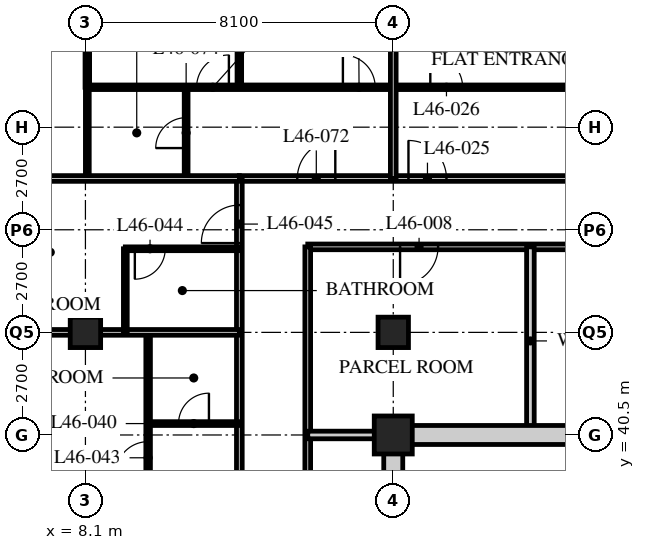
"""IFC4 building model, lengths in metres.
Left out: names, types, materials, properties, quantities, classifications, styles, units other than length and angle.
Written with IfcOpenShell. Run it as: python <this file> out.ifc"""

import sys

from ifc_helpers import new_model, si_unit, direction, frame, frame_2d, origin, origin_2d, place, context, subcontext, project, spatial, rectangle, hollow_rectangle, extrude, element, fill, save


model = new_model("IFC4")
c1 = context("Model", 3, precision=1e-05, world=origin(), true_north=direction((0.0, 1.0)))
c2 = subcontext(c1, "Body", "Model", "MODEL_VIEW")
j1 = project(units=[si_unit("LENGTHUNIT", "METRE"), si_unit("PLANEANGLEUNIT", "RADIAN")], contexts=[c1])
p1 = place(None, origin())
s1 = spatial("IfcSite", under=j1, at=p1, CompositionType="ELEMENT")
p2 = place(p1, origin())
s2 = spatial("IfcBuilding", under=s1, at=p2, CompositionType="ELEMENT")
p3 = place(p2, frame((0.0, 0.0, 181.2)))
s3 = spatial("IfcBuildingStorey", under=s2, at=p3, CompositionType="ELEMENT", Elevation=181.2)
p4 = place(p3, frame((8.1, 43.2, 0.0), z_axis=(0.0, 0.0, 1.0), x_axis=(1.0, 0.0, 0.0)))
e1 = element("IfcColumn", 1, at=p4, inside=s3, PredefinedType="COLUMN", context=c2, shape_type="SweptSolid", body=[
    extrude(hollow_rectangle(XDim=0.8, YDim=0.8, WallThickness=0.08, at=origin_2d()), origin(), (0.0, 0.0, 1.0), 3.6),
])
p5 = place(p3, frame((16.2, 40.5, 0.0), z_axis=(0.0, 0.0, 1.0), x_axis=(1.0, 0.0, 0.0)))
e2 = element("IfcColumn", 2, at=p5, inside=s3, PredefinedType="COLUMN", context=c2, shape_type="SweptSolid", body=[
    extrude(hollow_rectangle(XDim=1.0, YDim=1.0, WallThickness=0.1, at=origin_2d()), origin(), (0.0, 0.0, 1.0), 3.6),
])
p6 = place(p3, frame((16.2, 43.2, 0.0), z_axis=(0.0, 0.0, 1.0), x_axis=(1.0, 0.0, 0.0)))
e3 = element("IfcColumn", 3, at=p6, inside=s3, PredefinedType="COLUMN", context=c2, shape_type="SweptSolid", body=[
    extrude(hollow_rectangle(XDim=0.8, YDim=0.8, WallThickness=0.08, at=origin_2d()), origin(), (0.0, 0.0, 1.0), 3.6),
])
p7 = place(p3, frame((12.15, 47.25, 0.0), z_axis=(0.0, 0.0, 1.0), x_axis=(1.0, 0.0, 0.0)))
e4 = element("IfcWall", 4, at=p7, inside=s3, PredefinedType="PARTITIONING", context=c2, shape_type="SweptSolid", body=[
    extrude(rectangle(XDim=32.4, YDim=0.15, at=frame_2d((16.2, 0.0))), origin(), (0.0, 0.0, 1.0), 3.39),
])
p8 = place(p7, frame((4.45, 0.0, 0.0)))
e5 = element("IfcOpeningElement", 5, at=p8, cuts=e4, PredefinedType="OPENING", context=c2, shape_type="SweptSolid", body=[
    extrude(rectangle(XDim=1.0, YDim=2.1, at=frame_2d((0.5, 1.05))), frame((0.0, 0.085, 0.0), z_axis=(0.0, -1.0, 0.0), x_axis=(1.0, 0.0, 0.0)), (0.0, 0.0, 1.0), 0.17),
])
p9 = place(p7, frame((16.6, 0.0, 0.0)))
e6 = element("IfcOpeningElement", 6, at=p9, cuts=e4, PredefinedType="OPENING", context=c2, shape_type="SweptSolid", body=[
    extrude(rectangle(XDim=1.0, YDim=2.1, at=frame_2d((0.5, 1.05))), frame((0.0, 0.085, 0.0), z_axis=(0.0, -1.0, 0.0), x_axis=(1.0, 0.0, 0.0)), (0.0, 0.0, 1.0), 0.17),
])
p10 = place(p7, frame((29.875, 0.0, 0.0)))
e7 = element("IfcOpeningElement", 7, at=p10, cuts=e4, PredefinedType="OPENING", context=c2, shape_type="SweptSolid", body=[
    extrude(rectangle(XDim=1.0, YDim=2.1, at=frame_2d((0.5, 1.05))), frame((0.0, 0.085, 0.0), z_axis=(0.0, -1.0, 0.0), x_axis=(1.0, 0.0, 0.0)), (0.0, 0.0, 1.0), 0.17),
])
p11 = place(p7, frame((1.525, 0.0, 0.0)))
e8 = element("IfcOpeningElement", 8, at=p11, cuts=e4, PredefinedType="OPENING", context=c2, shape_type="SweptSolid", body=[
    extrude(rectangle(XDim=1.0, YDim=2.1, at=frame_2d((0.5, 1.05))), frame((0.0, 0.085, 0.0), z_axis=(0.0, -1.0, 0.0), x_axis=(1.0, 0.0, 0.0)), (0.0, 0.0, 1.0), 0.17),
])
p12 = place(p3, frame((12.15, 18.9, 0.0), z_axis=(0.0, 0.0, 1.0), x_axis=(0.0, 1.0, 0.0)))
e9 = element("IfcWall", 9, at=p12, inside=s3, PredefinedType="PARTITIONING", context=c2, shape_type="SweptSolid", body=[
    extrude(rectangle(XDim=28.35, YDim=0.15, at=frame_2d((14.175, 0.0))), origin(), (0.0, 0.0, 1.0), 3.39),
])
p13 = place(p12, frame((2.35, 0.0, 0.0)))
e10 = element("IfcOpeningElement", 10, at=p13, cuts=e9, PredefinedType="OPENING", context=c2, shape_type="SweptSolid", body=[
    extrude(rectangle(XDim=1.0, YDim=2.1, at=frame_2d((0.5, 1.05))), frame((0.0, 0.085, 0.0), z_axis=(0.0, -1.0, 0.0), x_axis=(1.0, 0.0, 0.0)), (0.0, 0.0, 1.0), 0.17),
])
p14 = place(p12, frame((6.4, 0.0, 0.0)))
e11 = element("IfcOpeningElement", 11, at=p14, cuts=e9, PredefinedType="OPENING", context=c2, shape_type="SweptSolid", body=[
    extrude(rectangle(XDim=1.0, YDim=2.1, at=frame_2d((0.5, 1.05))), frame((0.0, 0.085, 0.0), z_axis=(0.0, -1.0, 0.0), x_axis=(1.0, 0.0, 0.0)), (0.0, 0.0, 1.0), 0.17),
])
p15 = place(p12, frame((8.5, 0.0, 0.0)))
e12 = element("IfcOpeningElement", 12, at=p15, cuts=e9, PredefinedType="OPENING", context=c2, shape_type="SweptSolid", body=[
    extrude(rectangle(XDim=1.0, YDim=2.1, at=frame_2d((0.5, 1.05))), frame((0.0, 0.085, 0.0), z_axis=(0.0, -1.0, 0.0), x_axis=(1.0, 0.0, 0.0)), (0.0, 0.0, 1.0), 0.17),
])
p16 = place(p12, frame((16.6, 0.0, 0.0)))
e13 = element("IfcOpeningElement", 13, at=p16, cuts=e9, PredefinedType="OPENING", context=c2, shape_type="SweptSolid", body=[
    extrude(rectangle(XDim=1.0, YDim=2.1, at=frame_2d((0.5, 1.05))), frame((0.0, 0.085, 0.0), z_axis=(0.0, -1.0, 0.0), x_axis=(1.0, 0.0, 0.0)), (0.0, 0.0, 1.0), 0.17),
])
p17 = place(p12, frame((26.65, 0.0, 0.0)))
e14 = element("IfcOpeningElement", 14, at=p17, cuts=e9, PredefinedType="OPENING", context=c2, shape_type="SweptSolid", body=[
    extrude(rectangle(XDim=1.0, YDim=2.1, at=frame_2d((0.5, 1.05))), frame((0.0, 0.085, 0.0), z_axis=(0.0, -1.0, 0.0), x_axis=(1.0, 0.0, 0.0)), (0.0, 0.0, 1.0), 0.17),
])
p18 = place(p3, frame((27.14, 45.45, 0.0), z_axis=(0.0, 0.0, 1.0), x_axis=(-1.0, 0.0, 0.0)))
e15 = element("IfcWall", 15, at=p18, inside=s3, PredefinedType="PARTITIONING", context=c2, shape_type="SweptSolid", body=[
    extrude(rectangle(XDim=13.19, YDim=0.15, at=frame_2d((6.595, 0.0))), origin(), (0.0, 0.0, 1.0), 3.39),
])
p19 = place(p18, frame((9.761, 0.0, 0.0)))
e16 = element("IfcOpeningElement", 16, at=p19, cuts=e15, PredefinedType="OPENING", context=c2, shape_type="SweptSolid", body=[
    extrude(rectangle(XDim=1.0, YDim=2.1, at=frame_2d((0.5, 1.05))), frame((0.0, 0.085, 0.0), z_axis=(0.0, -1.0, 0.0), x_axis=(1.0, 0.0, 0.0)), (0.0, 0.0, 1.0), 0.17),
])
p20 = place(p18, frame((3.161, 0.0, 0.0)))
e17 = element("IfcOpeningElement", 17, at=p20, cuts=e15, PredefinedType="OPENING", context=c2, shape_type="SweptSolid", body=[
    extrude(rectangle(XDim=1.0, YDim=2.1, at=frame_2d((0.5, 1.05))), frame((0.0, 0.085, 0.0), z_axis=(0.0, -1.0, 0.0), x_axis=(1.0, 0.0, 0.0)), (0.0, 0.0, 1.0), 0.17),
])
p21 = place(p3, frame((13.95, 45.45, 0.0), z_axis=(0.0, 0.0, 1.0), x_axis=(0.0, -1.0, 0.0)))
e18 = element("IfcWall", 18, at=p21, inside=s3, PredefinedType="PARTITIONING", context=c2, shape_type="SweptSolid", body=[
    extrude(rectangle(XDim=24.75, YDim=0.15, at=frame_2d((12.375, 0.0))), origin(), (0.0, 0.0, 1.0), 3.39),
])
p22 = place(p21, frame((16.6, 0.0, 0.0)))
e19 = element("IfcOpeningElement", 19, at=p22, cuts=e18, PredefinedType="OPENING", context=c2, shape_type="SweptSolid", body=[
    extrude(rectangle(XDim=1.0, YDim=2.1, at=frame_2d((0.5, 1.05))), frame((0.0, 0.085, 0.0), z_axis=(0.0, -1.0, 0.0), x_axis=(1.0, 0.0, 0.0)), (0.0, 0.0, 1.0), 0.17),
])
p23 = place(p21, frame((8.5, 0.0, 0.0)))
e20 = element("IfcOpeningElement", 20, at=p23, cuts=e18, PredefinedType="OPENING", context=c2, shape_type="SweptSolid", body=[
    extrude(rectangle(XDim=1.0, YDim=2.1, at=frame_2d((0.5, 1.05))), frame((0.0, 0.085, 0.0), z_axis=(0.0, -1.0, 0.0), x_axis=(1.0, 0.0, 0.0)), (0.0, 0.0, 1.0), 0.17),
])
p24 = place(p3, frame((19.809, 45.45, 0.0), z_axis=(0.0, 0.0, 1.0), x_axis=(0.0, -1.0, 0.0)))
e21 = element("IfcWall", 21, at=p24, inside=s3, PredefinedType="SOLIDWALL", context=c2, shape_type="SweptSolid", body=[
    extrude(rectangle(XDim=4.95, YDim=0.2, at=frame_2d((2.475, 0.0))), origin(), (0.0, 0.0, 1.0), 3.39),
])
p25 = place(p3, frame((13.95, 40.5, 0.0), z_axis=(0.0, 0.0, 1.0), x_axis=(1.0, 0.0, 0.0)))
e22 = element("IfcWall", 22, at=p25, inside=s3, PredefinedType="SOLIDWALL", context=c2, shape_type="SweptSolid", body=[
    extrude(rectangle(XDim=2.25, YDim=0.2, at=frame_2d((1.125, 0.0))), origin(), (0.0, 0.0, 1.0), 3.39),
])
p26 = place(p3, frame((9.75, 27.0, 0.0), z_axis=(0.0, 0.0, 1.0), x_axis=(0.0, 1.0, 0.0)))
e23 = element("IfcWall", 23, at=p26, inside=s3, PredefinedType="PARTITIONING", context=c2, shape_type="SweptSolid", body=[
    extrude(rectangle(XDim=16.2, YDim=0.12, at=frame_2d((8.1, 0.0))), origin(), (0.0, 0.0, 1.0), 3.39),
])
p27 = place(p26, frame((0.975, 0.0, 0.0)))
e24 = element("IfcOpeningElement", 24, at=p27, cuts=e23, PredefinedType="OPENING", context=c2, shape_type="SweptSolid", body=[
    extrude(rectangle(XDim=0.85, YDim=2.1, at=frame_2d((0.425, 1.05))), frame((0.0, 0.07, 0.0), z_axis=(0.0, -1.0, 0.0), x_axis=(1.0, 0.0, 0.0)), (0.0, 0.0, 1.0), 0.14),
])
p28 = place(p26, frame((4.375, 0.0, 0.0)))
e25 = element("IfcOpeningElement", 25, at=p28, cuts=e23, PredefinedType="OPENING", context=c2, shape_type="SweptSolid", body=[
    extrude(rectangle(XDim=0.85, YDim=2.1, at=frame_2d((0.425, 1.05))), frame((0.0, 0.07, 0.0), z_axis=(0.0, -1.0, 0.0), x_axis=(1.0, 0.0, 0.0)), (0.0, 0.0, 1.0), 0.14),
])
p29 = place(p26, frame((9.075, 0.0, 0.0)))
e26 = element("IfcOpeningElement", 26, at=p29, cuts=e23, PredefinedType="OPENING", context=c2, shape_type="SweptSolid", body=[
    extrude(rectangle(XDim=0.85, YDim=2.1, at=frame_2d((0.425, 1.05))), frame((0.0, 0.07, 0.0), z_axis=(0.0, -1.0, 0.0), x_axis=(1.0, 0.0, 0.0)), (0.0, 0.0, 1.0), 0.14),
])
p30 = place(p26, frame((12.475, 0.0, 0.0)))
e27 = element("IfcOpeningElement", 27, at=p30, cuts=e23, PredefinedType="OPENING", context=c2, shape_type="SweptSolid", body=[
    extrude(rectangle(XDim=0.85, YDim=2.1, at=frame_2d((0.425, 1.05))), frame((0.0, 0.07, 0.0), z_axis=(0.0, -1.0, 0.0), x_axis=(1.0, 0.0, 0.0)), (0.0, 0.0, 1.0), 0.14),
])
p31 = place(p3, frame((12.15, 40.8, 0.0), z_axis=(0.0, 0.0, 1.0), x_axis=(-1.0, 0.0, 0.0)))
e28 = element("IfcWall", 28, at=p31, inside=s3, PredefinedType="PARTITIONING", context=c2, shape_type="SweptSolid", body=[
    extrude(rectangle(XDim=2.4, YDim=0.1, at=frame_2d((1.2, 0.0))), origin(), (0.0, 0.0, 1.0), 3.39),
])
p32 = place(p31, frame((0.8, 0.0, 0.0)))
e29 = element("IfcOpeningElement", 29, at=p32, cuts=e28, PredefinedType="OPENING", context=c2, shape_type="SweptSolid", body=[
    extrude(rectangle(XDim=0.8, YDim=2.1, at=frame_2d((0.4, 1.05))), frame((0.0, 0.06, 0.0), z_axis=(0.0, -1.0, 0.0), x_axis=(1.0, 0.0, 0.0)), (0.0, 0.0, 1.0), 0.12),
])
p33 = place(p3, frame((12.15, 43.2, 0.0), z_axis=(0.0, 0.0, 1.0), x_axis=(-1.0, 0.0, 0.0)))
e30 = element("IfcWall", 30, at=p33, inside=s3, PredefinedType="PARTITIONING", context=c2, shape_type="SweptSolid", body=[
    extrude(rectangle(XDim=11.85, YDim=0.15, at=frame_2d((5.925, 0.0))), origin(), (0.0, 0.0, 1.0), 2.778),
])
p34 = place(p3, frame((9.15, 43.2, 0.0), z_axis=(0.0, 0.0, 1.0), x_axis=(0.0, 1.0, 0.0)))
e31 = element("IfcWall", 31, at=p34, inside=s3, PredefinedType="PARTITIONING", context=c2, shape_type="SweptSolid", body=[
    extrude(rectangle(XDim=2.2, YDim=0.1, at=frame_2d((1.1, 0.0))), origin(), (0.0, 0.0, 1.0), 3.39),
])
p35 = place(p3, frame((12.15, 45.4, 0.0), z_axis=(0.0, 0.0, 1.0), x_axis=(-1.0, 0.0, 0.0)))
e32 = element("IfcWall", 32, at=p35, inside=s3, PredefinedType="PARTITIONING", context=c2, shape_type="SweptSolid", body=[
    extrude(rectangle(XDim=3.0, YDim=0.1, at=frame_2d((1.5, 0.0))), origin(), (0.0, 0.0, 1.0), 3.39),
])
p36 = place(p35, frame((1.95, 0.0, 0.0)))
e33 = element("IfcOpeningElement", 33, at=p36, cuts=e32, PredefinedType="OPENING", context=c2, shape_type="SweptSolid", body=[
    extrude(rectangle(XDim=0.8, YDim=2.1, at=frame_2d((0.4, 1.05))), frame((0.0, 0.06, 0.0), z_axis=(0.0, -1.0, 0.0), x_axis=(1.0, 0.0, 0.0)), (0.0, 0.0, 1.0), 0.12),
])
p37 = place(p3, frame((10.75, 47.25, 0.0), z_axis=(0.0, 0.0, 1.0), x_axis=(0.0, 1.0, 0.0)))
e34 = element("IfcWall", 34, at=p37, inside=s3, PredefinedType="PARTITIONING", context=c2, shape_type="SweptSolid", body=[
    extrude(rectangle(XDim=2.4, YDim=0.1, at=frame_2d((1.2, 0.0))), origin(), (0.0, 0.0, 1.0), 3.39),
])
p38 = place(p37, frame((0.8, 0.0, 0.0)))
e35 = element("IfcOpeningElement", 35, at=p38, cuts=e34, PredefinedType="OPENING", context=c2, shape_type="SweptSolid", body=[
    extrude(rectangle(XDim=0.8, YDim=2.1, at=frame_2d((0.4, 1.05))), frame((0.0, 0.06, 0.0), z_axis=(0.0, -1.0, 0.0), x_axis=(1.0, 0.0, 0.0)), (0.0, 0.0, 1.0), 0.12),
])
p39 = place(p3, frame((8.15, 47.25, 0.0), z_axis=(0.0, 0.0, 1.0), x_axis=(0.0, 1.0, 0.0)))
e36 = element("IfcWall", 36, at=p39, inside=s3, PredefinedType="PARTITIONING", context=c2, shape_type="SweptSolid", body=[
    extrude(rectangle(XDim=2.4, YDim=0.1, at=frame_2d((1.2, 0.0))), origin(), (0.0, 0.0, 1.0), 2.778),
])
p40 = place(p3, frame((8.15, 49.65, 0.0), z_axis=(0.0, 0.0, 1.0), x_axis=(1.0, 0.0, 0.0)))
e37 = element("IfcWall", 37, at=p40, inside=s3, PredefinedType="PARTITIONING", context=c2, shape_type="SweptSolid", body=[
    extrude(rectangle(XDim=40.4, YDim=0.12, at=frame_2d((20.2, 0.0))), origin(), (0.0, 0.0, 1.0), 3.39),
])
p41 = place(p40, frame((9.025, 0.0, 0.0)))
e38 = element("IfcOpeningElement", 38, at=p41, cuts=e37, PredefinedType="OPENING", context=c2, shape_type="SweptSolid", body=[
    extrude(rectangle(XDim=0.85, YDim=2.1, at=frame_2d((0.425, 1.05))), frame((0.0, 0.07, 0.0), z_axis=(0.0, -1.0, 0.0), x_axis=(1.0, 0.0, 0.0)), (0.0, 0.0, 1.0), 0.14),
])
p42 = place(p40, frame((16.475, 0.0, 0.0)))
e39 = element("IfcOpeningElement", 39, at=p42, cuts=e37, PredefinedType="OPENING", context=c2, shape_type="SweptSolid", body=[
    extrude(rectangle(XDim=0.85, YDim=2.1, at=frame_2d((0.425, 1.05))), frame((0.0, 0.07, 0.0), z_axis=(0.0, -1.0, 0.0), x_axis=(1.0, 0.0, 0.0)), (0.0, 0.0, 1.0), 0.14),
])
p43 = place(p40, frame((21.175, 0.0, 0.0)))
e40 = element("IfcOpeningElement", 40, at=p43, cuts=e37, PredefinedType="OPENING", context=c2, shape_type="SweptSolid", body=[
    extrude(rectangle(XDim=0.85, YDim=2.1, at=frame_2d((0.425, 1.05))), frame((0.0, 0.07, 0.0), z_axis=(0.0, -1.0, 0.0), x_axis=(1.0, 0.0, 0.0)), (0.0, 0.0, 1.0), 0.14),
])
p44 = place(p40, frame((28.625, 0.0, 0.0)))
e41 = element("IfcOpeningElement", 41, at=p44, cuts=e37, PredefinedType="OPENING", context=c2, shape_type="SweptSolid", body=[
    extrude(rectangle(XDim=0.85, YDim=2.1, at=frame_2d((0.425, 1.05))), frame((0.0, 0.07, 0.0), z_axis=(0.0, -1.0, 0.0), x_axis=(1.0, 0.0, 0.0)), (0.0, 0.0, 1.0), 0.14),
])
p45 = place(p40, frame((32.825, 0.0, 0.0)))
e42 = element("IfcOpeningElement", 42, at=p45, cuts=e37, PredefinedType="OPENING", context=c2, shape_type="SweptSolid", body=[
    extrude(rectangle(XDim=0.85, YDim=2.1, at=frame_2d((0.425, 1.05))), frame((0.0, 0.07, 0.0), z_axis=(0.0, -1.0, 0.0), x_axis=(1.0, 0.0, 0.0)), (0.0, 0.0, 1.0), 0.14),
])
p46 = place(p40, frame((36.675, 0.0, 0.0)))
e43 = element("IfcOpeningElement", 43, at=p46, cuts=e37, PredefinedType="OPENING", context=c2, shape_type="SweptSolid", body=[
    extrude(rectangle(XDim=0.85, YDim=2.1, at=frame_2d((0.425, 1.05))), frame((0.0, 0.07, 0.0), z_axis=(0.0, -1.0, 0.0), x_axis=(1.0, 0.0, 0.0)), (0.0, 0.0, 1.0), 0.14),
])
p47 = place(p40, frame((6.725, 0.0, 0.0)))
e44 = element("IfcOpeningElement", 44, at=p47, cuts=e37, PredefinedType="OPENING", context=c2, shape_type="SweptSolid", body=[
    extrude(rectangle(XDim=0.85, YDim=2.1, at=frame_2d((0.425, 1.05))), frame((0.0, 0.07, 0.0), z_axis=(0.0, -1.0, 0.0), x_axis=(1.0, 0.0, 0.0)), (0.0, 0.0, 1.0), 0.14),
])
p48 = place(p40, frame((2.875, 0.0, 0.0)))
e45 = element("IfcOpeningElement", 45, at=p48, cuts=e37, PredefinedType="OPENING", context=c2, shape_type="SweptSolid", body=[
    extrude(rectangle(XDim=0.85, YDim=2.1, at=frame_2d((0.425, 1.05))), frame((0.0, 0.07, 0.0), z_axis=(0.0, -1.0, 0.0), x_axis=(1.0, 0.0, 0.0)), (0.0, 0.0, 1.0), 0.14),
])
p49 = place(p3, frame((12.15, 49.65, 0.0), z_axis=(0.0, 0.0, 1.0), x_axis=(0.0, 1.0, 0.0)))
e46 = element("IfcWall", 46, at=p49, inside=s3, PredefinedType="PARTITIONING", context=c2, shape_type="SweptSolid", body=[
    extrude(rectangle(XDim=9.45, YDim=0.12, at=frame_2d((4.725, 0.0))), origin(), (0.0, 0.0, 1.0), 3.39),
])
p50 = place(p3, frame((0.3, 47.25, 0.0), z_axis=(0.0, 0.0, 1.0), x_axis=(1.0, 0.0, 0.0)))
e47 = element("IfcWall", 47, at=p50, inside=s3, PredefinedType="PARTITIONING", context=c2, shape_type="SweptSolid", body=[
    extrude(rectangle(XDim=11.85, YDim=0.15, at=frame_2d((5.925, 0.0))), origin(), (0.0, 0.0, 1.0), 3.39),
])
p51 = place(p3, frame((16.2, 47.25, 0.0), z_axis=(0.0, 0.0, 1.0), x_axis=(0.0, 1.0, 0.0)))
e48 = element("IfcWall", 48, at=p51, inside=s3, PredefinedType="PARTITIONING", context=c2, shape_type="SweptSolid", body=[
    extrude(rectangle(XDim=11.85, YDim=0.15, at=frame_2d((5.925, 0.0))), origin(), (0.0, 0.0, 1.0), 2.778),
])
p52 = place(p3, frame((8.15, 49.65, 0.0), z_axis=(0.0, 0.0, 1.0), x_axis=(0.0, 1.0, 0.0)))
e49 = element("IfcWall", 49, at=p52, inside=s3, PredefinedType="PARTITIONING", context=c2, shape_type="SweptSolid", body=[
    extrude(rectangle(XDim=1.25, YDim=0.12, at=frame_2d((0.625, 0.0))), origin(), (0.0, 0.0, 1.0), 2.778),
])
p53 = place(p3, frame((15.95, 40.5, 0.0), z_axis=(0.0, 0.0, 1.0), x_axis=(1.0, 0.0, 0.0)))
e50 = element("IfcWall", 50, at=p53, inside=s3, PredefinedType="SOLIDWALL", context=c2, shape_type="SweptSolid", body=[
    extrude(rectangle(XDim=24.8, YDim=0.5, at=frame_2d((12.4, 0.0))), origin(), (0.0, 0.0, 1.0), 2.74),
])
p54 = place(p53, frame((11.5, 0.0, 0.0)))
e51 = element("IfcOpeningElement", 51, at=p54, cuts=e50, PredefinedType="OPENING", context=c2, shape_type="SweptSolid", body=[
    extrude(rectangle(XDim=1.8, YDim=2.4, at=frame_2d((0.9, 1.2))), frame((0.0, 0.26, 0.0), z_axis=(0.0, -1.0, 0.0), x_axis=(1.0, 0.0, 0.0)), (0.0, 0.0, 1.0), 0.52),
])
p55 = place(p3, frame((16.2, 24.55, 0.0), z_axis=(0.0, 0.0, 1.0), x_axis=(0.0, 1.0, 0.0)))
e52 = element("IfcWall", 52, at=p55, inside=s3, PredefinedType="SOLIDWALL", context=c2, shape_type="SweptSolid", body=[
    extrude(rectangle(XDim=15.7, YDim=0.5, at=frame_2d((7.85, 0.0))), origin(), (0.0, 0.0, 1.0), 2.778),
])
p56 = place(p19, origin())
e53 = element("IfcDoor", 53, at=p56, inside=s3, OperationType="SINGLE_SWING_RIGHT", PredefinedType="DOOR", context=c2, shape_type="SweptSolid", body=[
    extrude(rectangle(XDim=1.0, YDim=2.1, at=frame_2d((0.5, 1.05))), frame((0.0, 0.025, 0.0), z_axis=(0.0, -1.0, 0.0), x_axis=(1.0, 0.0, 0.0)), (0.0, 0.0, 1.0), 0.05),
])
fill(e16, e53)
p57 = place(p8, origin())
e54 = element("IfcDoor", 54, at=p57, inside=s3, OperationType="SINGLE_SWING_LEFT", PredefinedType="DOOR", context=c2, shape_type="SweptSolid", body=[
    extrude(rectangle(XDim=1.0, YDim=2.1, at=frame_2d((0.5, 1.05))), frame((0.0, 0.025, 0.0), z_axis=(0.0, -1.0, 0.0), x_axis=(1.0, 0.0, 0.0)), (0.0, 0.0, 1.0), 0.05),
])
fill(e5, e54)
p58 = place(p41, origin())
e55 = element("IfcDoor", 55, at=p58, inside=s3, OperationType="SINGLE_SWING_LEFT", PredefinedType="DOOR", context=c2, shape_type="SweptSolid", body=[
    extrude(rectangle(XDim=0.85, YDim=2.1, at=frame_2d((0.425, 1.05))), frame((0.0, 0.025, 0.0), z_axis=(0.0, -1.0, 0.0), x_axis=(1.0, 0.0, 0.0)), (0.0, 0.0, 1.0), 0.05),
])
fill(e38, e55)
p59 = place(p32, origin())
e56 = element("IfcDoor", 56, at=p59, inside=s3, OperationType="SINGLE_SWING_RIGHT", PredefinedType="DOOR", context=c2, shape_type="SweptSolid", body=[
    extrude(rectangle(XDim=0.8, YDim=2.1, at=frame_2d((0.4, 1.05))), frame((0.0, 0.025, 0.0), z_axis=(0.0, -1.0, 0.0), x_axis=(1.0, 0.0, 0.0)), (0.0, 0.0, 1.0), 0.05),
])
fill(e29, e56)
p60 = place(p30, origin())
e57 = element("IfcDoor", 57, at=p60, inside=s3, OperationType="SINGLE_SWING_LEFT", PredefinedType="DOOR", context=c2, shape_type="SweptSolid", body=[
    extrude(rectangle(XDim=0.85, YDim=2.1, at=frame_2d((0.425, 1.05))), frame((0.0, 0.025, 0.0), z_axis=(0.0, -1.0, 0.0), x_axis=(1.0, 0.0, 0.0)), (0.0, 0.0, 1.0), 0.05),
])
fill(e27, e57)
p61 = place(p36, origin())
e58 = element("IfcDoor", 58, at=p61, inside=s3, OperationType="SINGLE_SWING_RIGHT", PredefinedType="DOOR", context=c2, shape_type="SweptSolid", body=[
    extrude(rectangle(XDim=0.8, YDim=2.1, at=frame_2d((0.4, 1.05))), frame((0.0, 0.025, 0.0), z_axis=(0.0, -1.0, 0.0), x_axis=(1.0, 0.0, 0.0)), (0.0, 0.0, 1.0), 0.05),
])
fill(e33, e58)
p62 = place(p17, origin())
e59 = element("IfcDoor", 59, at=p62, inside=s3, OperationType="SINGLE_SWING_LEFT", PredefinedType="DOOR", context=c2, shape_type="SweptSolid", body=[
    extrude(rectangle(XDim=1.0, YDim=2.1, at=frame_2d((0.5, 1.05))), frame((0.0, 0.025, 0.0), z_axis=(0.0, -1.0, 0.0), x_axis=(1.0, 0.0, 0.0)), (0.0, 0.0, 1.0), 0.05),
])
fill(e14, e59)
p63 = place(p11, origin())
e60 = element("IfcDoor", 60, at=p63, inside=s3, OperationType="SINGLE_SWING_RIGHT", PredefinedType="DOOR", context=c2, shape_type="SweptSolid", body=[
    extrude(rectangle(XDim=1.0, YDim=2.1, at=frame_2d((0.5, 1.05))), frame((0.0, 0.025, 0.0), z_axis=(0.0, -1.0, 0.0), x_axis=(1.0, 0.0, 0.0)), (0.0, 0.0, 1.0), 0.05),
])
fill(e8, e60)
p64 = place(p47, origin())
e61 = element("IfcDoor", 61, at=p64, inside=s3, OperationType="SINGLE_SWING_LEFT", PredefinedType="DOOR", context=c2, shape_type="SweptSolid", body=[
    extrude(rectangle(XDim=0.85, YDim=2.1, at=frame_2d((0.425, 1.05))), frame((0.0, 0.025, 0.0), z_axis=(0.0, -1.0, 0.0), x_axis=(1.0, 0.0, 0.0)), (0.0, 0.0, 1.0), 0.05),
])
fill(e44, e61)
p65 = place(p38, origin())
e62 = element("IfcDoor", 62, at=p65, inside=s3, OperationType="SINGLE_SWING_LEFT", PredefinedType="DOOR", context=c2, shape_type="SweptSolid", body=[
    extrude(rectangle(XDim=0.8, YDim=2.1, at=frame_2d((0.4, 1.05))), frame((0.0, 0.025, 0.0), z_axis=(0.0, -1.0, 0.0), x_axis=(1.0, 0.0, 0.0)), (0.0, 0.0, 1.0), 0.05),
])
fill(e35, e62)
p66 = place(p48, origin())
e63 = element("IfcDoor", 63, at=p66, inside=s3, OperationType="SINGLE_SWING_RIGHT", PredefinedType="DOOR", context=c2, shape_type="SweptSolid", body=[
    extrude(rectangle(XDim=0.85, YDim=2.1, at=frame_2d((0.425, 1.05))), frame((0.0, 0.025, 0.0), z_axis=(0.0, -1.0, 0.0), x_axis=(1.0, 0.0, 0.0)), (0.0, 0.0, 1.0), 0.05),
])
fill(e45, e63)
save(model, sys.argv[1])
